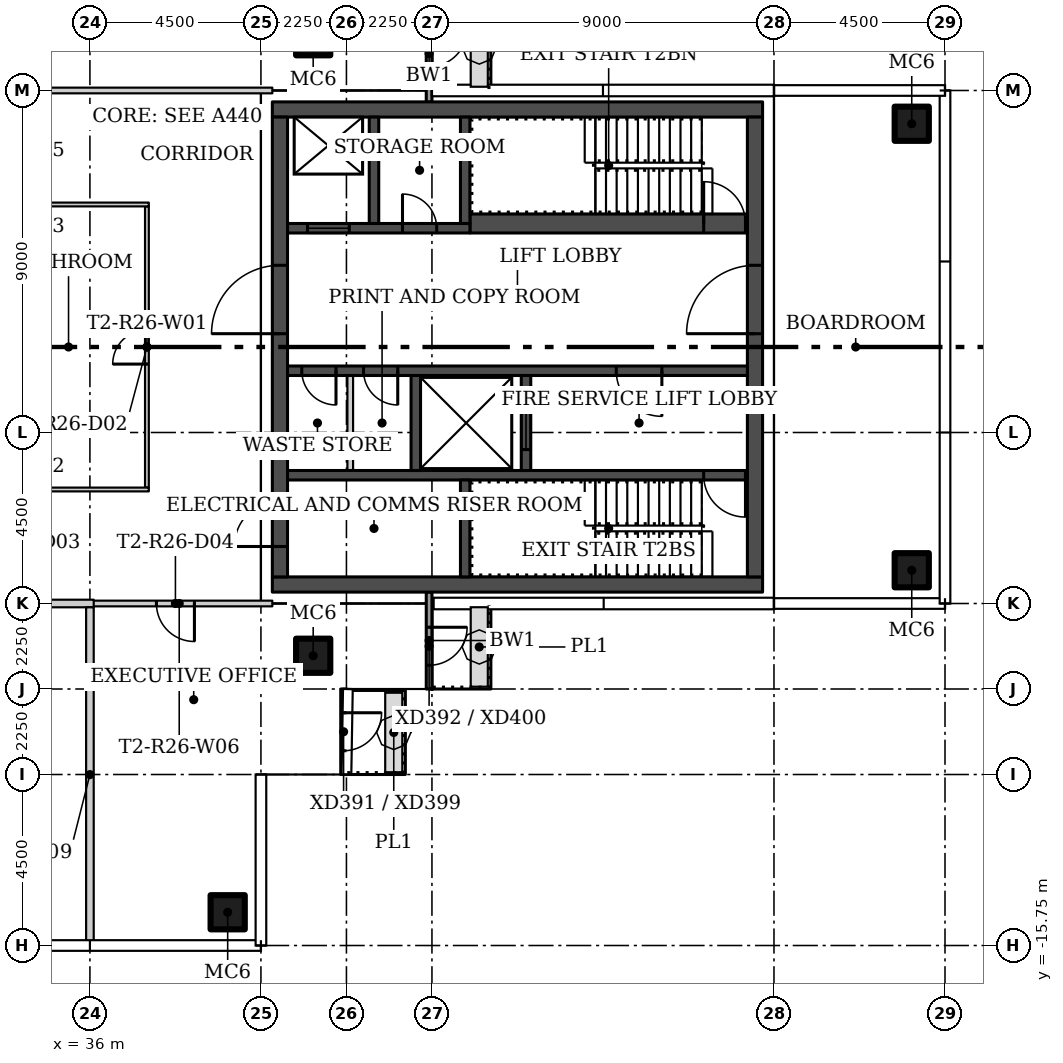
"""IFC4 building model, lengths in metres.
Left out: names, types, materials, properties, quantities, classifications, styles, units other than length and angle.
Written with IfcOpenShell. Run it as: python <this file> out.ifc"""

import sys

from ifc_helpers import new_model, si_unit, direction, frame, frame_2d, origin, origin_2d, place, context, subcontext, project, spatial, rectangle, hollow_rectangle, extrude, element, fill, save


model = new_model("IFC4")
c1 = context("Model", 3, precision=1e-05, world=origin(), true_north=direction((0.0, 1.0)))
c2 = subcontext(c1, "Body", "Model", "MODEL_VIEW")
j1 = project(units=[si_unit("LENGTHUNIT", "METRE"), si_unit("PLANEANGLEUNIT", "RADIAN")], contexts=[c1])
p1 = place(None, origin())
s1 = spatial("IfcSite", under=j1, at=p1, CompositionType="ELEMENT")
p2 = place(p1, origin())
s2 = spatial("IfcBuilding", under=s1, at=p2, CompositionType="ELEMENT")
p3 = place(p2, frame((0.0, 0.0, 242.1)))
s3 = spatial("IfcBuildingStorey", under=s2, at=p3, CompositionType="ELEMENT", Elevation=242.1)
for number, where in (
    (1, (41.875, 8.125, 0.0)),
    (2, (41.875, -8.125, 0.0)),
    (3, (39.625, -14.875, 0.0)),
    (4, (57.625, -5.875, 0.0)),
    (5, (57.625, 5.875, 0.0)),
):
    element("IfcColumn", number, at=place(p3, frame(where)), inside=s3, PredefinedType="COLUMN", context=c2, shape_type="SweptSolid", body=[
        extrude(hollow_rectangle(XDim=0.9, YDim=0.9, WallThickness=0.036, at=origin_2d()), origin(), (0.0, 0.0, 1.0), 3.55),
    ])
p4 = place(p3, frame((37.5, -3.7, 0.0), z_axis=(0.0, 0.0, 1.0), x_axis=(0.0, 1.0, 0.0)))
e6 = element("IfcWall", 6, at=p4, inside=s3, PredefinedType="PARTITIONING", context=c2, shape_type="SweptSolid", body=[
    extrude(rectangle(XDim=7.4, YDim=0.1, at=frame_2d((3.7, 0.0))), origin(), (0.0, 0.0, 1.0), 3.55),
])
p5 = place(p4, frame((3.25, 0.0, 0.0)))
e7 = element("IfcOpeningElement", 7, at=p5, cuts=e6, PredefinedType="OPENING", context=c2, shape_type="SweptSolid", body=[
    extrude(rectangle(XDim=0.9, YDim=2.1, at=frame_2d((0.45, 1.05))), frame((0.0, 0.06, 0.0), z_axis=(0.0, -1.0, 0.0), x_axis=(1.0, 0.0, 0.0)), (0.0, 0.0, 1.0), 0.12),
])
p6 = place(p3, frame((29.95, -3.75, 0.0)))
e8 = element("IfcWall", 8, at=p6, inside=s3, PredefinedType="PARTITIONING", context=c2, shape_type="SweptSolid", body=[
    extrude(rectangle(XDim=7.6, YDim=0.1, at=frame_2d((3.8, 0.0))), origin(), (0.0, 0.0, 1.0), 3.55),
])
p7 = place(p3, frame((37.55, 3.75, 0.0), z_axis=(0.0, 0.0, 1.0), x_axis=(-1.0, 0.0, 0.0)))
e9 = element("IfcWall", 9, at=p7, inside=s3, PredefinedType="PARTITIONING", context=c2, shape_type="SweptSolid", body=[
    extrude(rectangle(XDim=7.6, YDim=0.1, at=frame_2d((3.8, 0.0))), origin(), (0.0, 0.0, 1.0), 3.55),
])
p8 = place(p3, frame((26.7, 6.75, 0.0)))
e10 = element("IfcWall", 10, at=p8, inside=s3, PredefinedType="PARTITIONING", context=c2, shape_type="SweptSolid", body=[
    extrude(rectangle(XDim=14.1, YDim=0.15, at=frame_2d((7.05, 0.0))), origin(), (0.0, 0.0, 1.0), 3.55),
])
p9 = place(p8, frame((6.3, 0.0, 0.0)))
e11 = element("IfcOpeningElement", 11, at=p9, cuts=e10, PredefinedType="OPENING", context=c2, shape_type="SweptSolid", body=[
    extrude(rectangle(XDim=1.5, YDim=2.1, at=frame_2d((0.75, 1.05))), frame((0.0, 0.085, 0.0), z_axis=(0.0, -1.0, 0.0), x_axis=(1.0, 0.0, 0.0)), (0.0, 0.0, 1.0), 0.17),
])
p10 = place(p3, frame((40.8, -6.75, 0.0), z_axis=(0.0, 0.0, 1.0), x_axis=(-1.0, 0.0, 0.0)))
e12 = element("IfcWall", 12, at=p10, inside=s3, PredefinedType="PARTITIONING", context=c2, shape_type="SweptSolid", body=[
    extrude(rectangle(XDim=4.9, YDim=0.15, at=frame_2d((2.45, 0.0))), origin(), (0.0, 0.0, 1.0), 3.55),
])
p11 = place(p10, frame((2.05, 0.0, 0.0)))
e13 = element("IfcOpeningElement", 13, at=p11, cuts=e12, PredefinedType="OPENING", context=c2, shape_type="SweptSolid", body=[
    extrude(rectangle(XDim=1.0, YDim=2.4, at=frame_2d((0.5, 1.2))), frame((0.0, 0.085, 0.0), z_axis=(0.0, -1.0, 0.0), x_axis=(1.0, 0.0, 0.0)), (0.0, 0.0, 1.0), 0.17),
])
p12 = place(p3, frame((26.7, -6.75, 0.0)))
e14 = element("IfcWall", 14, at=p12, inside=s3, PredefinedType="PARTITIONING", context=c2, shape_type="SweptSolid", body=[
    extrude(rectangle(XDim=9.4, YDim=0.2, at=frame_2d((4.7, 0.0))), origin(), (0.0, 0.0, 1.0), 3.55),
])
p13 = place(p12, frame((6.75, 0.0, 0.0)))
e15 = element("IfcOpeningElement", 15, at=p13, cuts=e14, PredefinedType="OPENING", context=c2, shape_type="SweptSolid", body=[
    extrude(rectangle(XDim=1.5, YDim=2.4, at=frame_2d((0.75, 1.2))), frame((0.0, 0.11, 0.0), z_axis=(0.0, -1.0, 0.0), x_axis=(1.0, 0.0, 0.0)), (0.0, 0.0, 1.0), 0.22),
])
p14 = place(p12, frame((1.35, 0.0, 0.0)))
e16 = element("IfcOpeningElement", 16, at=p14, cuts=e14, PredefinedType="OPENING", context=c2, shape_type="SweptSolid", body=[
    extrude(rectangle(XDim=1.5, YDim=2.4, at=frame_2d((0.75, 1.2))), frame((0.0, 0.11, 0.0), z_axis=(0.0, -1.0, 0.0), x_axis=(1.0, 0.0, 0.0)), (0.0, 0.0, 1.0), 0.22),
])
p15 = place(p3, frame((36.0, -6.85, 0.0), z_axis=(0.0, 0.0, 1.0), x_axis=(0.0, -1.0, 0.0)))
e17 = element("IfcWall", 17, at=p15, inside=s3, PredefinedType="PARTITIONING", context=c2, shape_type="SweptSolid", body=[
    extrude(rectangle(XDim=8.805, YDim=0.2, at=frame_2d((4.402, 0.0))), origin(), (0.0, 0.0, 1.0), 3.55),
])
p16 = place(p3, frame((44.925, 9.0, 0.0), z_axis=(0.0, 0.0, 1.0), x_axis=(0.0, -1.0, 0.0)))
e18 = element("IfcWall", 18, at=p16, inside=s3, PredefinedType="SOLIDWALL", context=c2, shape_type="SweptSolid", body=[
    extrude(rectangle(XDim=2.557, YDim=0.15, at=frame_2d((1.278, 0.0))), origin(), (0.0, 0.0, 1.0), 3.45),
])
p17 = place(p16, frame((0.625, 0.0, 0.0)))
e19 = element("IfcOpeningElement", 19, at=p17, cuts=e18, PredefinedType="OPENING", context=c2, shape_type="SweptSolid", body=[
    extrude(rectangle(XDim=1.0, YDim=2.4, at=frame_2d((0.5, 1.2))), frame((0.0, 0.085, 0.0), z_axis=(0.0, -1.0, 0.0), x_axis=(1.0, 0.0, 0.0)), (0.0, 0.0, 1.0), 0.17),
])
p18 = place(p3, frame((42.675, -9.0, 0.0), z_axis=(0.0, 0.0, 1.0), x_axis=(0.0, -1.0, 0.0)))
e20 = element("IfcWall", 20, at=p18, inside=s3, PredefinedType="SOLIDWALL", context=c2, shape_type="SweptSolid", body=[
    extrude(rectangle(XDim=2.25, YDim=0.15, at=frame_2d((1.125, 0.0))), origin(), (0.0, 0.0, 1.0), 3.45),
])
p19 = place(p18, frame((0.625, 0.0, 0.0)))
e21 = element("IfcOpeningElement", 21, at=p19, cuts=e20, PredefinedType="OPENING", context=c2, shape_type="SweptSolid", body=[
    extrude(rectangle(XDim=1.0, YDim=2.4, at=frame_2d((0.5, 1.2))), frame((0.0, 0.085, 0.0), z_axis=(0.0, -1.0, 0.0), x_axis=(1.0, 0.0, 0.0)), (0.0, 0.0, 1.0), 0.17),
])
p20 = place(p3, frame((44.925, -6.448, 0.0), z_axis=(0.0, 0.0, 1.0), x_axis=(0.0, -1.0, 0.0)))
e22 = element("IfcWall", 22, at=p20, inside=s3, PredefinedType="SOLIDWALL", context=c2, shape_type="SweptSolid", body=[
    extrude(rectangle(XDim=2.552, YDim=0.15, at=frame_2d((1.276, 0.0))), origin(), (0.0, 0.0, 1.0), 3.45),
])
p21 = place(p20, frame((0.927, 0.0, 0.0)))
e23 = element("IfcOpeningElement", 23, at=p21, cuts=e22, PredefinedType="OPENING", context=c2, shape_type="SweptSolid", body=[
    extrude(rectangle(XDim=1.0, YDim=2.4, at=frame_2d((0.5, 1.2))), frame((0.0, 0.085, 0.0), z_axis=(0.0, -1.0, 0.0), x_axis=(1.0, 0.0, 0.0)), (0.0, 0.0, 1.0), 0.17),
])
for number, where, z_axis, x_axis in (
    (24, (53.7, -6.25, 0.0), (0.0, 0.0, 1.0), (-1.0, 0.0, 0.0)),
    (25, (53.7, 6.25, 0.0), (0.0, 0.0, 1.0), (-1.0, 0.0, 0.0)),
):
    element("IfcWall", number, at=place(p3, frame(where, z_axis=z_axis, x_axis=x_axis)), inside=s3, PredefinedType="SHEAR", context=c2, shape_type="SweptSolid", body=[
        extrude(rectangle(XDim=12.9, YDim=0.4, at=frame_2d((6.45, 0.0))), origin(), (0.0, 0.0, 1.0), 3.55),
    ])
p22 = place(p3, frame((53.5, -6.05, 0.0), z_axis=(0.0, 0.0, 1.0), x_axis=(0.0, 1.0, 0.0)))
e26 = element("IfcWall", 26, at=p22, inside=s3, PredefinedType="SHEAR", context=c2, shape_type="SweptSolid", body=[
    extrude(rectangle(XDim=12.1, YDim=0.4, at=frame_2d((6.05, 0.0))), origin(), (0.0, 0.0, 1.0), 3.55),
])
p23 = place(p22, frame((6.4, 0.0, 0.0)))
e27 = element("IfcOpeningElement", 27, at=p23, cuts=e26, PredefinedType="OPENING", context=c2, shape_type="SweptSolid", body=[
    extrude(rectangle(XDim=1.8, YDim=2.4, at=frame_2d((0.9, 1.2))), frame((0.0, 0.21, 0.0), z_axis=(0.0, -1.0, 0.0), x_axis=(1.0, 0.0, 0.0)), (0.0, 0.0, 1.0), 0.42),
])
p24 = place(p3, frame((41.0, -6.05, 0.0), z_axis=(0.0, 0.0, 1.0), x_axis=(0.0, 1.0, 0.0)))
e28 = element("IfcWall", 28, at=p24, inside=s3, PredefinedType="SHEAR", context=c2, shape_type="SweptSolid", body=[
    extrude(rectangle(XDim=12.1, YDim=0.4, at=frame_2d((6.05, 0.0))), origin(), (0.0, 0.0, 1.0), 3.55),
])
p25 = place(p24, frame((0.8, 0.0, 0.0)))
e29 = element("IfcOpeningElement", 29, at=p25, cuts=e28, PredefinedType="OPENING", context=c2, shape_type="SweptSolid", body=[
    extrude(rectangle(XDim=1.2, YDim=2.1, at=frame_2d((0.6, 1.05))), frame((0.0, 0.21, 0.0), z_axis=(0.0, -1.0, 0.0), x_axis=(1.0, 0.0, 0.0)), (0.0, 0.0, 1.0), 0.42),
])
p26 = place(p24, frame((6.4, 0.0, 0.0)))
e30 = element("IfcOpeningElement", 30, at=p26, cuts=e28, PredefinedType="OPENING", context=c2, shape_type="SweptSolid", body=[
    extrude(rectangle(XDim=1.8, YDim=2.4, at=frame_2d((0.9, 1.2))), frame((0.0, 0.21, 0.0), z_axis=(0.0, -1.0, 0.0), x_axis=(1.0, 0.0, 0.0)), (0.0, 0.0, 1.0), 0.42),
])
p27 = place(p3, frame((53.3, -3.375, 0.0), z_axis=(0.0, 0.0, 1.0), x_axis=(-1.0, 0.0, 0.0)))
e31 = element("IfcWall", 31, at=p27, inside=s3, PredefinedType="SHEAR", context=c2, shape_type="SweptSolid", body=[
    extrude(rectangle(XDim=12.1, YDim=0.25, at=frame_2d((6.05, 0.0))), origin(), (0.0, 0.0, 1.0), 3.55),
])
p28 = place(p27, frame((0.05, 0.0, 0.0)))
e32 = element("IfcOpeningElement", 32, at=p28, cuts=e31, PredefinedType="OPENING", context=c2, shape_type="SweptSolid", body=[
    extrude(rectangle(XDim=1.1, YDim=2.1, at=frame_2d((0.55, 1.05))), frame((0.0, 0.135, 0.0), z_axis=(0.0, -1.0, 0.0), x_axis=(1.0, 0.0, 0.0)), (0.0, 0.0, 1.0), 0.27),
])
p29 = place(p3, frame((45.875, -6.05, 0.0), z_axis=(0.0, 0.0, 1.0), x_axis=(0.0, 1.0, 0.0)))
e33 = element("IfcWall", 33, at=p29, inside=s3, PredefinedType="SHEAR", context=c2, shape_type="SweptSolid", body=[
    extrude(rectangle(XDim=2.55, YDim=0.25, at=frame_2d((1.275, 0.0))), origin(), (0.0, 0.0, 1.0), 3.55),
])
p30 = place(p3, frame((53.3, -0.625, 0.0), z_axis=(0.0, 0.0, 1.0), x_axis=(-1.0, 0.0, 0.0)))
e34 = element("IfcWall", 34, at=p30, inside=s3, PredefinedType="SHEAR", context=c2, shape_type="SweptSolid", body=[
    extrude(rectangle(XDim=12.1, YDim=0.25, at=frame_2d((6.05, 0.0))), origin(), (0.0, 0.0, 1.0), 3.55),
])
p31 = place(p30, frame((2.25, 0.0, 0.0)))
e35 = element("IfcOpeningElement", 35, at=p31, cuts=e34, PredefinedType="OPENING", context=c2, shape_type="SweptSolid", body=[
    extrude(rectangle(XDim=1.2, YDim=2.1, at=frame_2d((0.6, 1.05))), frame((0.0, 0.135, 0.0), z_axis=(0.0, -1.0, 0.0), x_axis=(1.0, 0.0, 0.0)), (0.0, 0.0, 1.0), 0.27),
])
p32 = place(p30, frame((9.2, 0.0, 0.0)))
e36 = element("IfcOpeningElement", 36, at=p32, cuts=e34, PredefinedType="OPENING", context=c2, shape_type="SweptSolid", body=[
    extrude(rectangle(XDim=0.9, YDim=2.1, at=frame_2d((0.45, 1.05))), frame((0.0, 0.135, 0.0), z_axis=(0.0, -1.0, 0.0), x_axis=(1.0, 0.0, 0.0)), (0.0, 0.0, 1.0), 0.27),
])
p33 = place(p30, frame((10.825, 0.0, 0.0)))
e37 = element("IfcOpeningElement", 37, at=p33, cuts=e34, PredefinedType="OPENING", context=c2, shape_type="SweptSolid", body=[
    extrude(rectangle(XDim=0.9, YDim=2.1, at=frame_2d((0.45, 1.05))), frame((0.0, 0.135, 0.0), z_axis=(0.0, -1.0, 0.0), x_axis=(1.0, 0.0, 0.0)), (0.0, 0.0, 1.0), 0.27),
])
p34 = place(p3, frame((47.475, -3.25, 0.0), z_axis=(0.0, 0.0, 1.0), x_axis=(0.0, 1.0, 0.0)))
e38 = element("IfcWall", 38, at=p34, inside=s3, PredefinedType="SHEAR", context=c2, shape_type="SweptSolid", body=[
    extrude(rectangle(XDim=2.5, YDim=0.25, at=frame_2d((1.25, 0.0))), origin(), (0.0, 0.0, 1.0), 3.55),
])
p35 = place(p34, frame((0.55, 0.0, 0.0)))
e39 = element("IfcOpeningElement", 39, at=p35, cuts=e38, PredefinedType="OPENING", context=c2, shape_type="SweptSolid", body=[
    extrude(rectangle(XDim=1.4, YDim=2.4, at=frame_2d((0.7, 1.2))), frame((0.0, 0.135, 0.0), z_axis=(0.0, -1.0, 0.0), x_axis=(1.0, 0.0, 0.0)), (0.0, 0.0, 1.0), 0.27),
])
p36 = place(p3, frame((44.575, -3.25, 0.0), z_axis=(0.0, 0.0, 1.0), x_axis=(0.0, 1.0, 0.0)))
e40 = element("IfcWall", 40, at=p36, inside=s3, PredefinedType="SHEAR", context=c2, shape_type="SweptSolid", body=[
    extrude(rectangle(XDim=2.5, YDim=0.25, at=frame_2d((1.25, 0.0))), origin(), (0.0, 0.0, 1.0), 3.55),
])
p37 = place(p3, frame((42.85, -3.25, 0.0), z_axis=(0.0, 0.0, 1.0), x_axis=(0.0, 1.0, 0.0)))
e41 = element("IfcWall", 41, at=p37, inside=s3, PredefinedType="PARTITIONING", context=c2, shape_type="SweptSolid", body=[
    extrude(rectangle(XDim=2.5, YDim=0.15, at=frame_2d((1.25, 0.0))), origin(), (0.0, 0.0, 1.0), 3.55),
])
p38 = place(p3, frame((46.0, 3.25, 0.0)))
e42 = element("IfcWall", 42, at=p38, inside=s3, PredefinedType="SHEAR", context=c2, shape_type="SweptSolid", body=[
    extrude(rectangle(XDim=7.3, YDim=0.5, at=frame_2d((3.65, 0.0))), origin(), (0.0, 0.0, 1.0), 3.55),
])
p39 = place(p38, frame((6.15, 0.0, 0.0)))
e43 = element("IfcOpeningElement", 43, at=p39, cuts=e42, PredefinedType="OPENING", context=c2, shape_type="SweptSolid", body=[
    extrude(rectangle(XDim=1.1, YDim=2.1, at=frame_2d((0.55, 1.05))), frame((0.0, 0.26, 0.0), z_axis=(0.0, -1.0, 0.0), x_axis=(1.0, 0.0, 0.0)), (0.0, 0.0, 1.0), 0.52),
])
p40 = place(p3, frame((41.2, 3.125, 0.0)))
e44 = element("IfcWall", 44, at=p40, inside=s3, PredefinedType="SHEAR", context=c2, shape_type="SweptSolid", body=[
    extrude(rectangle(XDim=4.8, YDim=0.25, at=frame_2d((2.4, 0.0))), origin(), (0.0, 0.0, 1.0), 3.55),
])
p41 = place(p40, frame((0.525, 0.0, 0.0)))
e45 = element("IfcOpeningElement", 45, at=p41, cuts=e44, PredefinedType="OPENING", context=c2, shape_type="SweptSolid", body=[
    extrude(rectangle(XDim=1.1, YDim=2.1, at=frame_2d((0.55, 1.05))), frame((0.0, 0.135, 0.0), z_axis=(0.0, -1.0, 0.0), x_axis=(1.0, 0.0, 0.0)), (0.0, 0.0, 1.0), 0.27),
])
p42 = place(p40, frame((3.025, 0.0, 0.0)))
e46 = element("IfcOpeningElement", 46, at=p42, cuts=e44, PredefinedType="OPENING", context=c2, shape_type="SweptSolid", body=[
    extrude(rectangle(XDim=0.9, YDim=2.1, at=frame_2d((0.45, 1.05))), frame((0.0, 0.135, 0.0), z_axis=(0.0, -1.0, 0.0), x_axis=(1.0, 0.0, 0.0)), (0.0, 0.0, 1.0), 0.27),
])
for number, where, z_axis, x_axis in (
    (47, (45.875, 3.25, 0.0), (0.0, 0.0, 1.0), (0.0, 1.0, 0.0)),
    (48, (43.475, 3.25, 0.0), (0.0, 0.0, 1.0), (0.0, 1.0, 0.0)),
):
    element("IfcWall", number, at=place(p3, frame(where, z_axis=z_axis, x_axis=x_axis)), inside=s3, PredefinedType="SHEAR", context=c2, shape_type="SweptSolid", body=[
        extrude(rectangle(XDim=2.8, YDim=0.25, at=frame_2d((1.4, 0.0))), origin(), (0.0, 0.0, 1.0), 3.55),
    ])
p43 = place(p5, origin())
e49 = element("IfcDoor", 49, at=p43, inside=s3, OperationType="SINGLE_SWING_LEFT", PredefinedType="DOOR", context=c2, shape_type="SweptSolid", body=[
    extrude(rectangle(XDim=0.9, YDim=2.1, at=frame_2d((0.45, 1.05))), frame((0.0, 0.025, 0.0), z_axis=(0.0, -1.0, 0.0), x_axis=(1.0, 0.0, 0.0)), (0.0, 0.0, 1.0), 0.05),
])
fill(e7, e49)
p44 = place(p11, origin())
e50 = element("IfcDoor", 50, at=p44, inside=s3, OperationType="SINGLE_SWING_RIGHT", PredefinedType="DOOR", context=c2, shape_type="SweptSolid", body=[
    extrude(rectangle(XDim=1.0, YDim=2.4, at=frame_2d((0.5, 1.2))), frame((0.0, 0.025, 0.0), z_axis=(0.0, -1.0, 0.0), x_axis=(1.0, 0.0, 0.0)), (0.0, 0.0, 1.0), 0.05),
])
fill(e13, e50)
p45 = place(p17, origin())
e51 = element("IfcDoor", 51, at=p45, inside=s3, OperationType="SINGLE_SWING_LEFT", PredefinedType="DOOR", context=c2, shape_type="SweptSolid", body=[
    extrude(rectangle(XDim=1.0, YDim=2.4, at=frame_2d((0.5, 1.2))), frame((0.0, 0.025, 0.0), z_axis=(0.0, -1.0, 0.0), x_axis=(1.0, 0.0, 0.0)), (0.0, 0.0, 1.0), 0.05),
])
fill(e19, e51)
p46 = place(p19, origin())
e52 = element("IfcDoor", 52, at=p46, inside=s3, OperationType="SINGLE_SWING_LEFT", PredefinedType="DOOR", context=c2, shape_type="SweptSolid", body=[
    extrude(rectangle(XDim=1.0, YDim=2.4, at=frame_2d((0.5, 1.2))), frame((0.0, 0.025, 0.0), z_axis=(0.0, -1.0, 0.0), x_axis=(1.0, 0.0, 0.0)), (0.0, 0.0, 1.0), 0.05),
])
fill(e21, e52)
p47 = place(p21, origin())
e53 = element("IfcDoor", 53, at=p47, inside=s3, OperationType="SINGLE_SWING_RIGHT", PredefinedType="DOOR", context=c2, shape_type="SweptSolid", body=[
    extrude(rectangle(XDim=1.0, YDim=2.4, at=frame_2d((0.5, 1.2))), frame((0.0, 0.025, 0.0), z_axis=(0.0, -1.0, 0.0), x_axis=(1.0, 0.0, 0.0)), (0.0, 0.0, 1.0), 0.05),
])
fill(e23, e53)
p48 = place(p23, origin())
e54 = element("IfcDoor", 54, at=p48, inside=s3, OperationType="DOUBLE_DOOR_SINGLE_SWING", PredefinedType="DOOR", context=c2, shape_type="SweptSolid", body=[
    extrude(rectangle(XDim=1.8, YDim=2.4, at=frame_2d((0.9, 1.2))), frame((0.0, 0.025, 0.0), z_axis=(0.0, -1.0, 0.0), x_axis=(1.0, 0.0, 0.0)), (0.0, 0.0, 1.0), 0.05),
])
fill(e27, e54)
p49 = place(p25, origin())
e55 = element("IfcDoor", 55, at=p49, inside=s3, OperationType="SINGLE_SWING_LEFT", PredefinedType="DOOR", context=c2, shape_type="SweptSolid", body=[
    extrude(rectangle(XDim=1.2, YDim=2.1, at=frame_2d((0.6, 1.05))), frame((0.0, 0.025, 0.0), z_axis=(0.0, -1.0, 0.0), x_axis=(1.0, 0.0, 0.0)), (0.0, 0.0, 1.0), 0.05),
])
fill(e29, e55)
p50 = place(p26, origin())
e56 = element("IfcDoor", 56, at=p50, inside=s3, OperationType="DOUBLE_DOOR_SINGLE_SWING", PredefinedType="DOOR", context=c2, shape_type="SweptSolid", body=[
    extrude(rectangle(XDim=1.8, YDim=2.4, at=frame_2d((0.9, 1.2))), frame((0.0, 0.025, 0.0), z_axis=(0.0, -1.0, 0.0), x_axis=(1.0, 0.0, 0.0)), (0.0, 0.0, 1.0), 0.05),
])
fill(e30, e56)
p51 = place(p28, origin())
e57 = element("IfcDoor", 57, at=p51, inside=s3, OperationType="SINGLE_SWING_LEFT", PredefinedType="DOOR", context=c2, shape_type="SweptSolid", body=[
    extrude(rectangle(XDim=1.1, YDim=2.1, at=frame_2d((0.55, 1.05))), frame((0.0, 0.025, 0.0), z_axis=(0.0, -1.0, 0.0), x_axis=(1.0, 0.0, 0.0)), (0.0, 0.0, 1.0), 0.05),
])
fill(e32, e57)
p52 = place(p31, origin())
e58 = element("IfcDoor", 58, at=p52, inside=s3, OperationType="SINGLE_SWING_LEFT", PredefinedType="DOOR", context=c2, shape_type="SweptSolid", body=[
    extrude(rectangle(XDim=1.2, YDim=2.1, at=frame_2d((0.6, 1.05))), frame((0.0, 0.025, 0.0), z_axis=(0.0, -1.0, 0.0), x_axis=(1.0, 0.0, 0.0)), (0.0, 0.0, 1.0), 0.05),
])
fill(e35, e58)
p53 = place(p32, origin())
e59 = element("IfcDoor", 59, at=p53, inside=s3, OperationType="SINGLE_SWING_RIGHT", PredefinedType="DOOR", context=c2, shape_type="SweptSolid", body=[
    extrude(rectangle(XDim=0.9, YDim=2.1, at=frame_2d((0.45, 1.05))), frame((0.0, 0.025, 0.0), z_axis=(0.0, -1.0, 0.0), x_axis=(1.0, 0.0, 0.0)), (0.0, 0.0, 1.0), 0.05),
])
fill(e36, e59)
p54 = place(p33, origin())
e60 = element("IfcDoor", 60, at=p54, inside=s3, OperationType="SINGLE_SWING_RIGHT", PredefinedType="DOOR", context=c2, shape_type="SweptSolid", body=[
    extrude(rectangle(XDim=0.9, YDim=2.1, at=frame_2d((0.45, 1.05))), frame((0.0, 0.025, 0.0), z_axis=(0.0, -1.0, 0.0), x_axis=(1.0, 0.0, 0.0)), (0.0, 0.0, 1.0), 0.05),
])
fill(e37, e60)
p55 = place(p35, origin())
e61 = element("IfcDoor", 61, at=p55, inside=s3, OperationType="SLIDING_TO_LEFT", PredefinedType="DOOR", context=c2, shape_type="SweptSolid", body=[
    extrude(rectangle(XDim=1.4, YDim=2.4, at=frame_2d((0.7, 1.2))), frame((0.0, 0.025, 0.0), z_axis=(0.0, -1.0, 0.0), x_axis=(1.0, 0.0, 0.0)), (0.0, 0.0, 1.0), 0.05),
])
fill(e39, e61)
p56 = place(p39, origin())
e62 = element("IfcDoor", 62, at=p56, inside=s3, OperationType="SINGLE_SWING_RIGHT", PredefinedType="DOOR", context=c2, shape_type="SweptSolid", body=[
    extrude(rectangle(XDim=1.1, YDim=2.1, at=frame_2d((0.55, 1.05))), frame((0.0, 0.025, 0.0), z_axis=(0.0, -1.0, 0.0), x_axis=(1.0, 0.0, 0.0)), (0.0, 0.0, 1.0), 0.05),
])
fill(e43, e62)
p57 = place(p41, origin())
e63 = element("IfcDoor", 63, at=p57, inside=s3, OperationType="SLIDING_TO_LEFT", PredefinedType="DOOR", context=c2, shape_type="SweptSolid", body=[
    extrude(rectangle(XDim=1.1, YDim=2.1, at=frame_2d((0.55, 1.05))), frame((0.0, 0.025, 0.0), z_axis=(0.0, -1.0, 0.0), x_axis=(1.0, 0.0, 0.0)), (0.0, 0.0, 1.0), 0.05),
])
fill(e45, e63)
p58 = place(p42, origin())
e64 = element("IfcDoor", 64, at=p58, inside=s3, OperationType="SINGLE_SWING_RIGHT", PredefinedType="DOOR", context=c2, shape_type="SweptSolid", body=[
    extrude(rectangle(XDim=0.9, YDim=2.1, at=frame_2d((0.45, 1.05))), frame((0.0, 0.025, 0.0), z_axis=(0.0, -1.0, 0.0), x_axis=(1.0, 0.0, 0.0)), (0.0, 0.0, 1.0), 0.05),
])
fill(e46, e64)
save(model, sys.argv[1])
